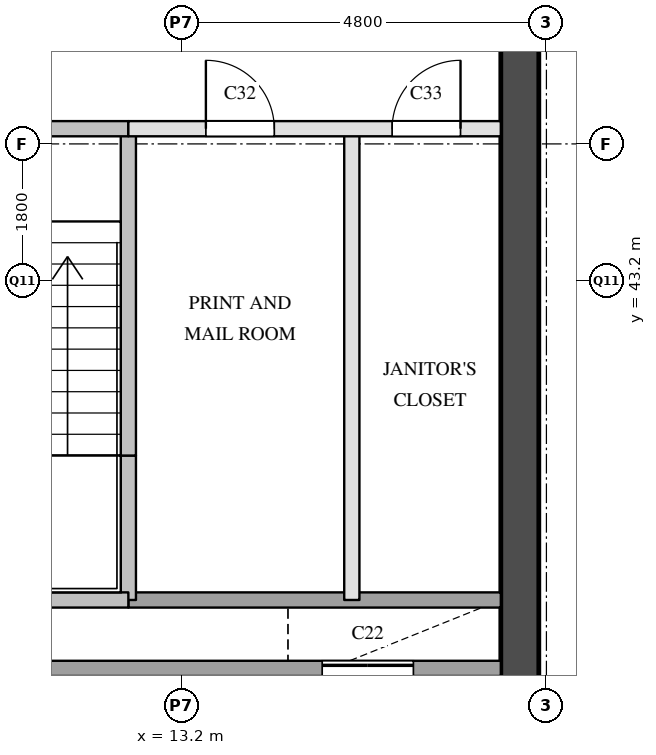
"""IFC4 building model, lengths in metres.
Left out: names, types, materials, properties, quantities, classifications, styles, units other than length and angle.
Written with IfcOpenShell. Run it as: python <this file> out.ifc"""

import sys

from ifc_helpers import new_model, si_unit, direction, frame, frame_2d, origin, place, context, subcontext, project, spatial, rectangle, extrude, element, fill, save


model = new_model("IFC4")
c1 = context("Model", 3, precision=1e-05, world=origin(), true_north=direction((0.0, 1.0)))
c2 = subcontext(c1, "Body", "Model", "MODEL_VIEW")
j1 = project(units=[si_unit("LENGTHUNIT", "METRE"), si_unit("PLANEANGLEUNIT", "RADIAN")], contexts=[c1])
p1 = place(None, origin())
s1 = spatial("IfcSite", under=j1, at=p1, CompositionType="ELEMENT")
p2 = place(p1, origin())
s2 = spatial("IfcBuilding", under=s1, at=p2, CompositionType="ELEMENT")
p3 = place(p2, frame((0.0, 0.0, 154.4)))
s3 = spatial("IfcBuildingStorey", under=s2, at=p3, CompositionType="ELEMENT", Elevation=154.4)
p4 = place(p3, frame((17.65, 29.1, 0.0), z_axis=(0.0, 0.0, 1.0), x_axis=(0.0, 1.0, 0.0)))
e1 = element("IfcWall", 1, at=p4, inside=s3, PredefinedType="SHEAR", context=c2, shape_type="SweptSolid", body=[
    extrude(rectangle(XDim=20.3, YDim=0.5, at=frame_2d((10.15, 0.0))), origin(), (0.0, 0.0, 1.0), 3.6),
])
p5 = place(p4, frame((1.25, 0.0, 0.0)))
e2 = element("IfcOpeningElement", 2, at=p5, cuts=e1, PredefinedType="OPENING", context=c2, shape_type="SweptSolid", body=[
    extrude(rectangle(XDim=0.7, YDim=2.1, at=frame_2d((0.35, 1.05))), frame((0.0, 0.26, 0.0), z_axis=(0.0, -1.0, 0.0), x_axis=(1.0, 0.0, 0.0)), (0.0, 0.0, 1.0), 0.52),
])
p6 = place(p4, frame((7.05, 0.0, 0.0)))
e3 = element("IfcOpeningElement", 3, at=p6, cuts=e1, PredefinedType="OPENING", context=c2, shape_type="SweptSolid", body=[
    extrude(rectangle(XDim=0.7, YDim=2.1, at=frame_2d((0.35, 1.05))), frame((0.0, 0.26, 0.0), z_axis=(0.0, -1.0, 0.0), x_axis=(1.0, 0.0, 0.0)), (0.0, 0.0, 1.0), 0.52),
])
p7 = place(p4, frame((3.6, 0.0, 0.0)))
e4 = element("IfcOpeningElement", 4, at=p7, cuts=e1, PredefinedType="OPENING", context=c2, shape_type="SweptSolid", body=[
    extrude(rectangle(XDim=1.8, YDim=2.1, at=frame_2d((0.9, 1.05))), frame((0.0, 0.26, 0.0), z_axis=(0.0, -1.0, 0.0), x_axis=(1.0, 0.0, 0.0)), (0.0, 0.0, 1.0), 0.52),
])
p8 = place(p3, frame((12.5, 39.0, 0.0), z_axis=(0.0, 0.0, 1.0), x_axis=(0.0, 1.0, 0.0)))
e5 = element("IfcWall", 5, at=p8, inside=s3, PredefinedType="SOLIDWALL", context=c2, shape_type="SweptSolid", body=[
    extrude(rectangle(XDim=1.9, YDim=0.2, at=frame_2d((0.95, 0.0))), origin(), (0.0, 0.0, 1.0), 3.6),
])
p9 = place(p3, frame((12.5, 40.9, 0.0), z_axis=(0.0, 0.0, 1.0), x_axis=(0.0, 1.0, 0.0)))
e6 = element("IfcWall", 6, at=p9, inside=s3, PredefinedType="SOLIDWALL", context=c2, shape_type="SweptSolid", body=[
    extrude(rectangle(XDim=4.3, YDim=0.2, at=frame_2d((2.15, 0.0))), origin(), (0.0, 0.0, 1.0), 3.6),
])
p10 = place(p3, frame((14.6, 34.9, 0.0), z_axis=(0.0, 0.0, 1.0), x_axis=(0.0, 1.0, 0.0)))
e7 = element("IfcWall", 7, at=p10, inside=s3, PredefinedType="SOLIDWALL", context=c2, shape_type="SweptSolid", body=[
    extrude(rectangle(XDim=3.2, YDim=0.2, at=frame_2d((1.6, 0.0))), origin(), (0.0, 0.0, 1.0), 3.6),
])
p11 = place(p3, frame((15.44, 39.0, 0.0), z_axis=(0.0, 0.0, 1.0), x_axis=(0.0, 1.0, 0.0)))
e8 = element("IfcWall", 8, at=p11, inside=s3, PredefinedType="PARTITIONING", context=c2, shape_type="SweptSolid", body=[
    extrude(rectangle(XDim=6.2, YDim=0.2, at=frame_2d((3.1, 0.0))), origin(), (0.0, 0.0, 1.0), 3.6),
])
p12 = place(p3, frame((16.7, 34.9, 0.0), z_axis=(0.0, 0.0, 1.0), x_axis=(0.0, 1.0, 0.0)))
e9 = element("IfcWall", 9, at=p12, inside=s3, PredefinedType="SOLIDWALL", context=c2, shape_type="SweptSolid", body=[
    extrude(rectangle(XDim=3.2, YDim=0.2, at=frame_2d((1.6, 0.0))), origin(), (0.0, 0.0, 1.0), 3.6),
])
p13 = place(p3, frame((6.2, 38.1, 0.0), z_axis=(0.0, 0.0, 1.0), x_axis=(1.0, 0.0, 0.0)))
e10 = element("IfcWall", 10, at=p13, inside=s3, PredefinedType="SOLIDWALL", context=c2, shape_type="SweptSolid", body=[
    extrude(rectangle(XDim=11.2, YDim=0.2, at=frame_2d((5.6, 0.0))), origin(), (0.0, 0.0, 1.0), 3.6),
])
p14 = place(p13, frame((8.85, 0.0, 0.0)))
e11 = element("IfcOpeningElement", 11, at=p14, cuts=e10, PredefinedType="OPENING", context=c2, shape_type="SweptSolid", body=[
    extrude(rectangle(XDim=1.2, YDim=2.1, at=frame_2d((0.6, 1.05))), frame((0.0, 0.11, 0.0), z_axis=(0.0, -1.0, 0.0), x_axis=(1.0, 0.0, 0.0)), (0.0, 0.0, 1.0), 0.22),
])
p15 = place(p3, frame((12.5, 39.0, 0.0), z_axis=(0.0, 0.0, 1.0), x_axis=(1.0, 0.0, 0.0)))
e12 = element("IfcWall", 12, at=p15, inside=s3, PredefinedType="SOLIDWALL", context=c2, shape_type="SweptSolid", body=[
    extrude(rectangle(XDim=4.9, YDim=0.2, at=frame_2d((2.45, 0.0))), origin(), (0.0, 0.0, 1.0), 3.6),
])
p16 = place(p3, frame((9.45, 39.0, 0.0), z_axis=(0.0, 0.0, 1.0), x_axis=(1.0, 0.0, 0.0)))
e13 = element("IfcWall", 13, at=p16, inside=s3, PredefinedType="SOLIDWALL", context=c2, shape_type="SweptSolid", body=[
    extrude(rectangle(XDim=3.05, YDim=0.2, at=frame_2d((1.525, 0.0))), origin(), (0.0, 0.0, 1.0), 3.6),
])
p17 = place(p3, frame((12.5, 45.2, 0.0), z_axis=(0.0, 0.0, 1.0), x_axis=(1.0, 0.0, 0.0)))
e14 = element("IfcWall", 14, at=p17, inside=s3, PredefinedType="PARTITIONING", context=c2, shape_type="SweptSolid", body=[
    extrude(rectangle(XDim=4.9, YDim=0.2, at=frame_2d((2.45, 0.0))), origin(), (0.0, 0.0, 1.0), 3.6),
])
p18 = place(p17, frame((1.02, 0.0, 0.0)))
e15 = element("IfcOpeningElement", 15, at=p18, cuts=e14, PredefinedType="OPENING", context=c2, shape_type="SweptSolid", body=[
    extrude(rectangle(XDim=0.9, YDim=2.1, at=frame_2d((0.45, 1.05))), frame((0.0, 0.11, 0.0), z_axis=(0.0, -1.0, 0.0), x_axis=(1.0, 0.0, 0.0)), (0.0, 0.0, 1.0), 0.22),
])
p19 = place(p17, frame((3.47, 0.0, 0.0)))
e16 = element("IfcOpeningElement", 16, at=p19, cuts=e14, PredefinedType="OPENING", context=c2, shape_type="SweptSolid", body=[
    extrude(rectangle(XDim=0.9, YDim=2.1, at=frame_2d((0.45, 1.05))), frame((0.0, 0.11, 0.0), z_axis=(0.0, -1.0, 0.0), x_axis=(1.0, 0.0, 0.0)), (0.0, 0.0, 1.0), 0.22),
])
p20 = place(p3, frame((6.2, 45.2, 0.0), z_axis=(0.0, 0.0, 1.0), x_axis=(1.0, 0.0, 0.0)))
e17 = element("IfcWall", 17, at=p20, inside=s3, PredefinedType="SOLIDWALL", context=c2, shape_type="SweptSolid", body=[
    extrude(rectangle(XDim=6.3, YDim=0.2, at=frame_2d((3.15, 0.0))), origin(), (0.0, 0.0, 1.0), 3.6),
])
p21 = place(p20, frame((1.025, 0.0, 0.0)))
e18 = element("IfcOpeningElement", 18, at=p21, cuts=e17, PredefinedType="OPENING", context=c2, shape_type="SweptSolid", body=[
    extrude(rectangle(XDim=1.1, YDim=2.1, at=frame_2d((0.55, 1.05))), frame((0.0, 0.11, 0.0), z_axis=(0.0, -1.0, 0.0), x_axis=(1.0, 0.0, 0.0)), (0.0, 0.0, 1.0), 0.22),
])
p22 = place(p20, frame((4.175, 0.0, 0.0)))
e19 = element("IfcOpeningElement", 19, at=p22, cuts=e17, PredefinedType="OPENING", context=c2, shape_type="SweptSolid", body=[
    extrude(rectangle(XDim=1.1, YDim=2.1, at=frame_2d((0.55, 1.05))), frame((0.0, 0.11, 0.0), z_axis=(0.0, -1.0, 0.0), x_axis=(1.0, 0.0, 0.0)), (0.0, 0.0, 1.0), 0.22),
])
p23 = place(p14, origin())
e20 = element("IfcDoor", 20, at=p23, inside=s3, OperationType="SLIDING_TO_LEFT", PredefinedType="DOOR", context=c2, shape_type="SweptSolid", body=[
    extrude(rectangle(XDim=1.2, YDim=2.1, at=frame_2d((0.6, 1.05))), frame((0.0, 0.025, 0.0), z_axis=(0.0, -1.0, 0.0), x_axis=(1.0, 0.0, 0.0)), (0.0, 0.0, 1.0), 0.05),
])
fill(e11, e20)
p24 = place(p18, origin())
e21 = element("IfcDoor", 21, at=p24, inside=s3, OperationType="SINGLE_SWING_LEFT", PredefinedType="DOOR", context=c2, shape_type="SweptSolid", body=[
    extrude(rectangle(XDim=0.9, YDim=2.1, at=frame_2d((0.45, 1.05))), frame((0.0, 0.025, 0.0), z_axis=(0.0, -1.0, 0.0), x_axis=(1.0, 0.0, 0.0)), (0.0, 0.0, 1.0), 0.05),
])
fill(e15, e21)
p25 = place(p19, origin())
e22 = element("IfcDoor", 22, at=p25, inside=s3, OperationType="SINGLE_SWING_RIGHT", PredefinedType="DOOR", context=c2, shape_type="SweptSolid", body=[
    extrude(rectangle(XDim=0.9, YDim=2.1, at=frame_2d((0.45, 1.05))), frame((0.0, 0.025, 0.0), z_axis=(0.0, -1.0, 0.0), x_axis=(1.0, 0.0, 0.0)), (0.0, 0.0, 1.0), 0.05),
])
fill(e16, e22)
save(model, sys.argv[1])
